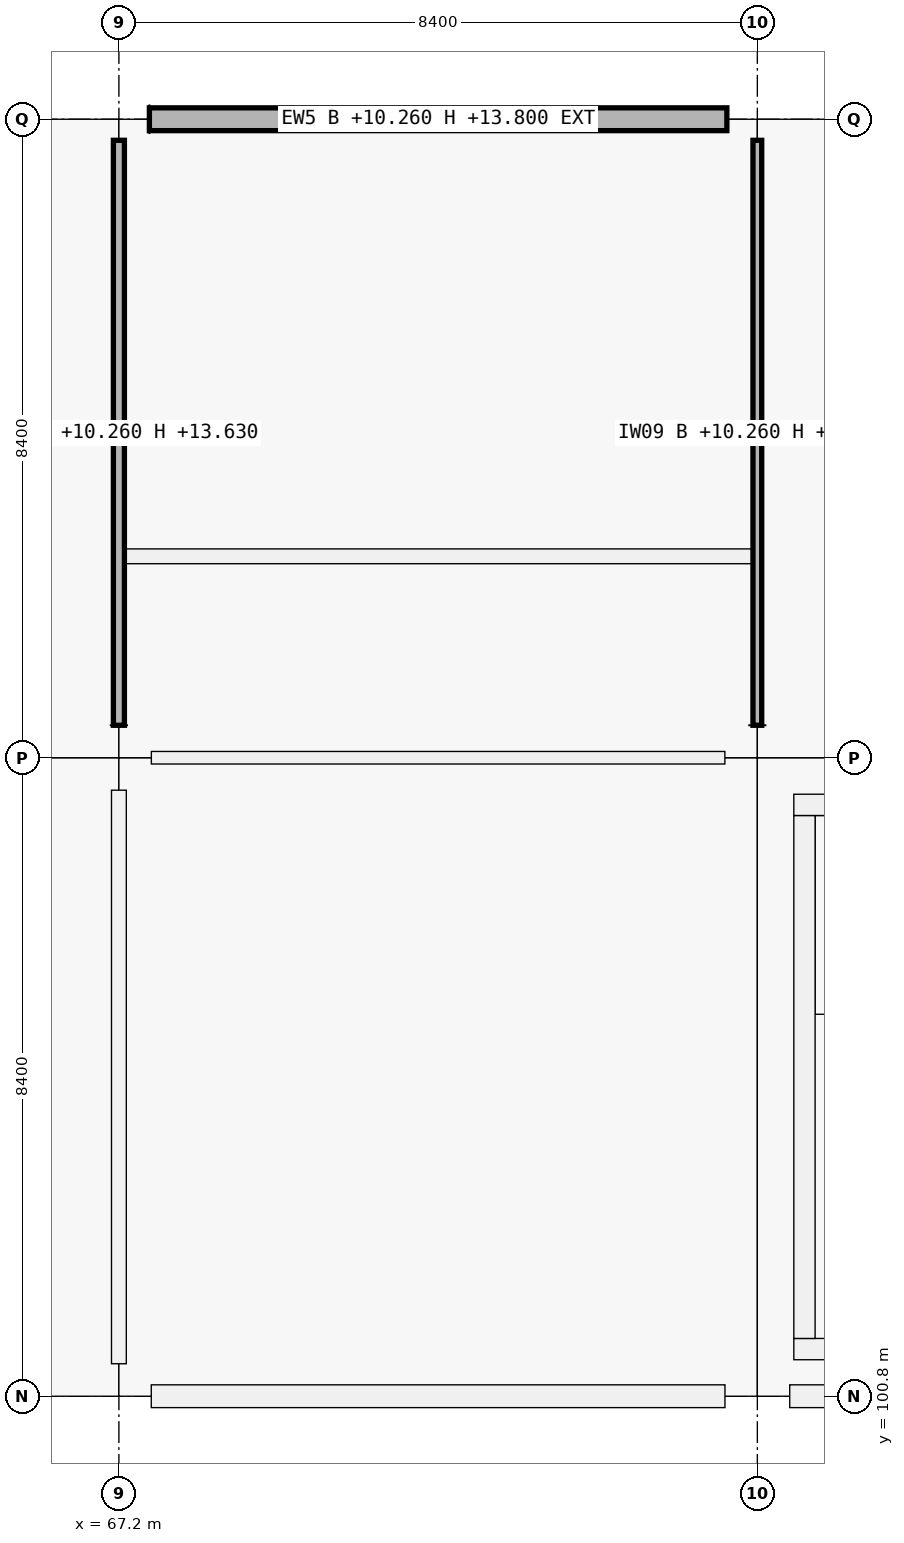
"""IFC4 building model, lengths in metres.
Left out: names, types, materials, properties, quantities, classifications, styles, units other than length and angle.
Written with IfcOpenShell. Run it as: python <this file> out.ifc"""

import sys

from ifc_helpers import new_model, si_unit, direction, frame, frame_2d, origin, origin_2d, place, context, subcontext, project, spatial, rectangle, extrude, element, fill, save


model = new_model("IFC4")
c1 = context("Model", 3, precision=1e-05, world=origin(), true_north=direction((0.0, 1.0)))
c2 = subcontext(c1, "Body", "Model", "MODEL_VIEW")
j1 = project(units=[si_unit("LENGTHUNIT", "METRE"), si_unit("PLANEANGLEUNIT", "RADIAN")], contexts=[c1])
p1 = place(None, origin())
s1 = spatial("IfcSite", under=j1, at=p1, CompositionType="ELEMENT")
p2 = place(p1, origin())
s2 = spatial("IfcBuilding", under=s1, at=p2, CompositionType="ELEMENT")
p3 = place(p2, frame((0.0, 0.0, 10.26)))
s3 = spatial("IfcBuildingStorey", under=s2, at=p3, CompositionType="ELEMENT", Elevation=10.26)
for number, where, z_axis, x_axis in (
    (1, (67.2, 100.8, 0.0), (0.0, 0.0, 1.0), (1.0, 0.0, 0.0)),
    (2, (67.2, 109.2, 0.0), (0.0, 0.0, 1.0), (1.0, 0.0, 0.0)),
):
    element("IfcColumn", number, at=place(p3, frame(where, z_axis=z_axis, x_axis=x_axis)), inside=s3, PredefinedType="COLUMN", context=c2, shape_type="SweptSolid", body=[
        extrude(rectangle(XDim=0.85, YDim=0.85, at=origin_2d()), origin(), (0.0, 0.0, 1.0), 4.5),
    ])
p4 = place(p3, frame((67.2, 117.6, 0.0), z_axis=(0.0, 0.0, 1.0), x_axis=(1.0, 0.0, 0.0)))
e3 = element("IfcColumn", 3, at=p4, inside=s3, PredefinedType="COLUMN", context=c2, shape_type="SweptSolid", body=[
    extrude(rectangle(XDim=0.8, YDim=0.55, at=origin_2d()), origin(), (0.0, 0.0, 1.0), 4.5),
])
for number, where, z_axis, x_axis in (
    (4, (75.6, 100.8, 0.0), (0.0, 0.0, 1.0), (1.0, 0.0, 0.0)),
    (5, (75.6, 109.2, 0.0), (0.0, 0.0, 1.0), (1.0, 0.0, 0.0)),
):
    element("IfcColumn", number, at=place(p3, frame(where, z_axis=z_axis, x_axis=x_axis)), inside=s3, PredefinedType="COLUMN", context=c2, shape_type="SweptSolid", body=[
        extrude(rectangle(XDim=0.85, YDim=0.85, at=origin_2d()), origin(), (0.0, 0.0, 1.0), 4.5),
    ])
p5 = place(p3, frame((75.6, 117.6, 0.0), z_axis=(0.0, 0.0, 1.0), x_axis=(1.0, 0.0, 0.0)))
e6 = element("IfcColumn", 6, at=p5, inside=s3, PredefinedType="COLUMN", context=c2, shape_type="SweptSolid", body=[
    extrude(rectangle(XDim=0.8, YDim=0.55, at=origin_2d()), origin(), (0.0, 0.0, 1.0), 4.5),
])
p6 = place(p3, frame((75.174, 100.8, 0.0), z_axis=(0.0, 0.0, 1.0), x_axis=(-1.0, 0.0, 0.0)))
e7 = element("IfcWall", 7, at=p6, inside=s3, PredefinedType="SOLIDWALL", context=c2, shape_type="SweptSolid", body=[
    extrude(rectangle(XDim=7.548, YDim=0.3, at=frame_2d((3.774, 0.0))), origin(), (0.0, 0.0, 1.0), 3.54),
])
p7 = place(p3, frame((67.601, 117.6, 0.0), z_axis=(0.0, 0.0, 1.0), x_axis=(1.0, 0.0, 0.0)))
e8 = element("IfcWall", 8, at=p7, inside=s3, PredefinedType="SOLIDWALL", context=c2, shape_type="SweptSolid", body=[
    extrude(rectangle(XDim=7.598, YDim=0.3, at=frame_2d((3.799, 0.0))), origin(), (0.0, 0.0, 1.0), 3.54),
])
p8 = place(p7, frame((3.124, 0.0, 0.9)))
e9 = element("IfcOpeningElement", 9, at=p8, cuts=e8, PredefinedType="OPENING", context=c2, shape_type="SweptSolid", body=[
    extrude(rectangle(XDim=1.35, YDim=1.5, at=frame_2d((0.675, 0.75))), frame((0.0, 0.15, 0.0), z_axis=(0.0, -1.0, 0.0), x_axis=(1.0, 0.0, 0.0)), (0.0, 0.0, 1.0), 0.3),
])
p9 = place(p3, frame((83.574, 100.8, 0.0), z_axis=(0.0, 0.0, 1.0), x_axis=(-1.0, 0.0, 0.0)))
e10 = element("IfcWall", 10, at=p9, inside=s3, PredefinedType="SOLIDWALL", context=c2, shape_type="SweptSolid", body=[
    extrude(rectangle(XDim=7.548, YDim=0.3, at=frame_2d((3.774, 0.0))), origin(), (0.0, 0.0, 1.0), 3.54),
])
p10 = place(p3, frame((83.52, 101.42, 0.0), z_axis=(0.0, 0.0, 1.0), x_axis=(-1.0, 0.0, 0.0)))
e11 = element("IfcWall", 11, at=p10, inside=s3, PredefinedType="SHEAR", context=c2, shape_type="SweptSolid", body=[
    extrude(rectangle(XDim=7.44, YDim=0.28, at=frame_2d((3.72, 0.0))), origin(), (0.0, 0.0, 1.0), 4.5),
])
p11 = place(p3, frame((76.22, 101.56, 0.0), z_axis=(0.0, 0.0, 1.0), x_axis=(0.0, 1.0, 0.0)))
e12 = element("IfcWall", 12, at=p11, inside=s3, PredefinedType="SHEAR", context=c2, shape_type="SweptSolid", body=[
    extrude(rectangle(XDim=6.88, YDim=0.28, at=frame_2d((3.44, 0.0))), origin(), (0.0, 0.0, 1.0), 4.5),
])
p12 = place(p3, frame((76.08, 108.58, 0.0), z_axis=(0.0, 0.0, 1.0), x_axis=(1.0, 0.0, 0.0)))
e13 = element("IfcWall", 13, at=p12, inside=s3, PredefinedType="SHEAR", context=c2, shape_type="SweptSolid", body=[
    extrude(rectangle(XDim=7.44, YDim=0.28, at=frame_2d((3.72, 0.0))), origin(), (0.0, 0.0, 1.0), 4.5),
])
p13 = place(p3, frame((67.627, 109.2, 0.0), z_axis=(0.0, 0.0, 1.0), x_axis=(1.0, 0.0, 0.0)))
e14 = element("IfcWall", 14, at=p13, inside=s3, PredefinedType="PARTITIONING", context=c2, shape_type="SweptSolid", body=[
    extrude(rectangle(XDim=7.546, YDim=0.165, at=frame_2d((3.773, 0.0))), origin(), (0.0, 0.0, 1.0), 3.37),
])
p14 = place(p3, frame((67.2, 101.227, 0.0), z_axis=(0.0, 0.0, 1.0), x_axis=(0.0, 1.0, 0.0)))
e15 = element("IfcWall", 15, at=p14, inside=s3, PredefinedType="PARTITIONING", context=c2, shape_type="SweptSolid", body=[
    extrude(rectangle(XDim=7.546, YDim=0.195, at=frame_2d((3.773, 0.0))), origin(), (0.0, 0.0, 1.0), 3.37),
])
p15 = place(p14, frame((3.273, 0.0, 0.0)))
e16 = element("IfcOpeningElement", 16, at=p15, cuts=e15, PredefinedType="OPENING", context=c2, shape_type="SweptSolid", body=[
    extrude(rectangle(XDim=1.0, YDim=2.2, at=frame_2d((0.5, 1.1))), frame((0.0, 0.098, 0.0), z_axis=(0.0, -1.0, 0.0), x_axis=(1.0, 0.0, 0.0)), (0.0, 0.0, 1.0), 0.195),
])
p16 = place(p3, frame((67.2, 109.627, 0.0), z_axis=(0.0, 0.0, 1.0), x_axis=(0.0, 1.0, 0.0)))
e17 = element("IfcWall", 17, at=p16, inside=s3, PredefinedType="PARTITIONING", context=c2, shape_type="SweptSolid", body=[
    extrude(rectangle(XDim=7.696, YDim=0.145, at=frame_2d((3.848, 0.0))), origin(), (0.0, 0.0, 1.0), 3.37),
])
p17 = place(p16, frame((0.558, 0.0, 0.0)))
e18 = element("IfcOpeningElement", 18, at=p17, cuts=e17, PredefinedType="OPENING", context=c2, shape_type="SweptSolid", body=[
    extrude(rectangle(XDim=0.96, YDim=2.1, at=frame_2d((0.48, 1.05))), frame((0.0, 0.073, 0.0), z_axis=(0.0, -1.0, 0.0), x_axis=(1.0, 0.0, 0.0)), (0.0, 0.0, 1.0), 0.145),
])
p18 = place(p16, frame((4.498, 0.0, 0.0)))
e19 = element("IfcOpeningElement", 19, at=p18, cuts=e17, PredefinedType="OPENING", context=c2, shape_type="SweptSolid", body=[
    extrude(rectangle(XDim=0.92, YDim=2.1, at=frame_2d((0.46, 1.05))), frame((0.0, 0.073, 0.0), z_axis=(0.0, -1.0, 0.0), x_axis=(1.0, 0.0, 0.0)), (0.0, 0.0, 1.0), 0.145),
])
p19 = place(p3, frame((75.6, 109.627, 0.0), z_axis=(0.0, 0.0, 1.0), x_axis=(0.0, 1.0, 0.0)))
e20 = element("IfcWall", 20, at=p19, inside=s3, PredefinedType="PARTITIONING", context=c2, shape_type="SweptSolid", body=[
    extrude(rectangle(XDim=7.696, YDim=0.115, at=frame_2d((3.848, 0.0))), origin(), (0.0, 0.0, 1.0), 3.37),
])
p20 = place(p3, frame((67.274, 111.85, 0.0), z_axis=(0.0, 0.0, 1.0), x_axis=(1.0, 0.0, 0.0)))
e21 = element("IfcWall", 21, at=p20, inside=s3, PredefinedType="PARTITIONING", context=c2, shape_type="SweptSolid", body=[
    extrude(rectangle(XDim=8.266, YDim=0.195, at=frame_2d((4.133, 0.0))), origin(), (0.0, 0.0, 1.0), 3.37),
])
p21 = place(p8, origin())
e22 = element("IfcWindow", 22, at=p21, inside=s3, PartitioningType="SINGLE_PANEL", PredefinedType="WINDOW", context=c2, shape_type="SweptSolid", body=[
    extrude(rectangle(XDim=1.35, YDim=1.5, at=frame_2d((0.675, 0.75))), frame((0.0, 0.03, 0.0), z_axis=(0.0, -1.0, 0.0), x_axis=(1.0, 0.0, 0.0)), (0.0, 0.0, 1.0), 0.06),
])
fill(e9, e22)
p22 = place(p17, origin())
e23 = element("IfcDoor", 23, at=p22, inside=s3, OperationType="SINGLE_SWING_RIGHT", PredefinedType="DOOR", context=c2, shape_type="SweptSolid", body=[
    extrude(rectangle(XDim=0.96, YDim=2.1, at=frame_2d((0.48, 1.05))), frame((0.0, 0.025, 0.0), z_axis=(0.0, -1.0, 0.0), x_axis=(1.0, 0.0, 0.0)), (0.0, 0.0, 1.0), 0.05),
])
fill(e18, e23)
p23 = place(p18, origin())
e24 = element("IfcDoor", 24, at=p23, inside=s3, OperationType="SINGLE_SWING_LEFT", PredefinedType="DOOR", context=c2, shape_type="SweptSolid", body=[
    extrude(rectangle(XDim=0.92, YDim=2.1, at=frame_2d((0.46, 1.05))), frame((0.0, 0.025, 0.0), z_axis=(0.0, -1.0, 0.0), x_axis=(1.0, 0.0, 0.0)), (0.0, 0.0, 1.0), 0.05),
])
fill(e19, e24)
p24 = place(p15, origin())
e25 = element("IfcDoor", 25, at=p24, inside=s3, OperationType="SINGLE_SWING_LEFT", PredefinedType="DOOR", context=c2, shape_type="SweptSolid", body=[
    extrude(rectangle(XDim=1.0, YDim=2.2, at=frame_2d((0.5, 1.1))), frame((0.0, 0.025, 0.0), z_axis=(0.0, -1.0, 0.0), x_axis=(1.0, 0.0, 0.0)), (0.0, 0.0, 1.0), 0.05),
])
fill(e16, e25)
save(model, sys.argv[1])
